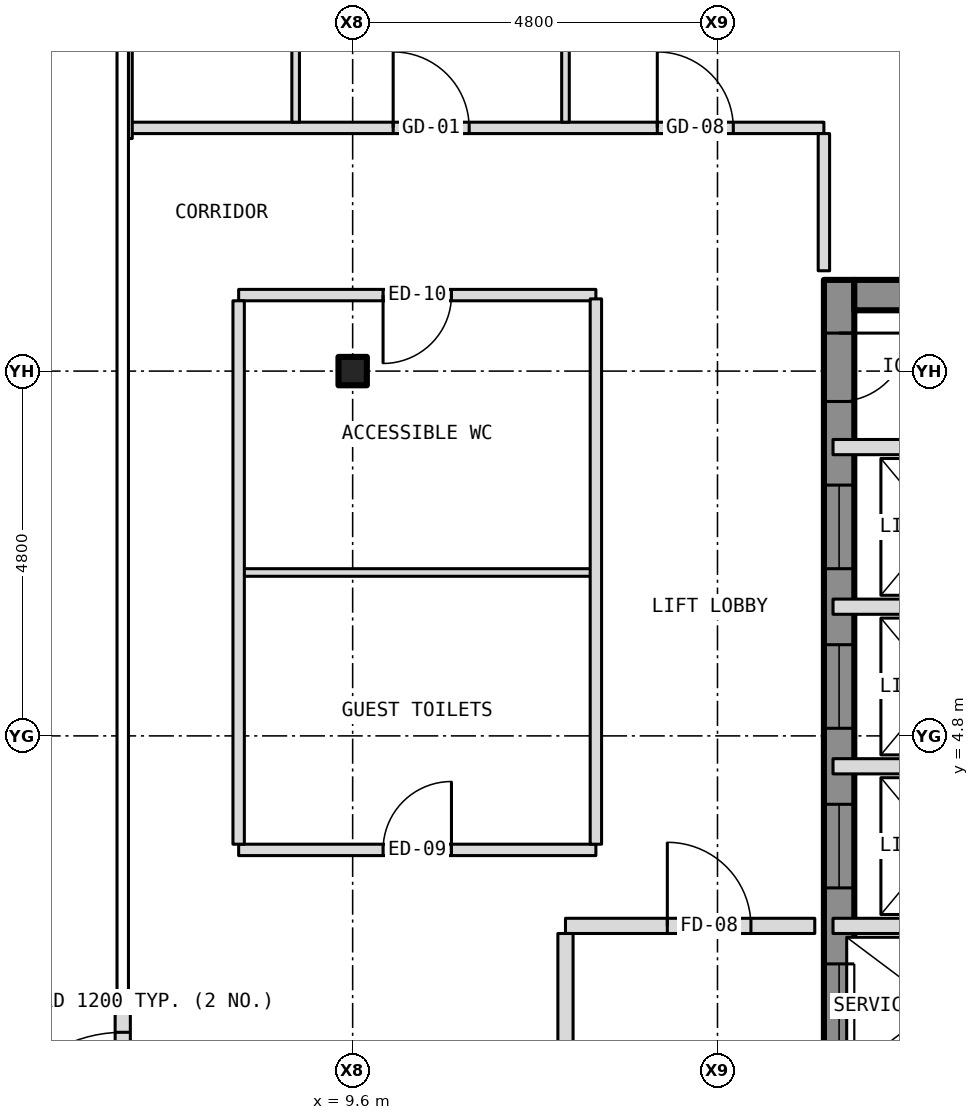
"""IFC4 building model, lengths in metres.
Left out: names, types, materials, properties, quantities, classifications, styles, units other than length and angle.
Written with IfcOpenShell. Run it as: python <this file> out.ifc"""

import sys

from ifc_helpers import new_model, si_unit, direction, frame, frame_2d, origin, origin_2d, place, context, subcontext, project, spatial, rectangle, i_section, extrude, element, fill, save


model = new_model("IFC4")
c1 = context("Model", 3, precision=1e-05, world=origin(), true_north=direction((0.0, 1.0)))
c2 = subcontext(c1, "Body", "Model", "MODEL_VIEW")
j1 = project(units=[si_unit("LENGTHUNIT", "METRE"), si_unit("PLANEANGLEUNIT", "RADIAN")], contexts=[c1])
p1 = place(None, origin())
s1 = spatial("IfcSite", under=j1, at=p1, CompositionType="ELEMENT")
p2 = place(p1, origin())
s2 = spatial("IfcBuilding", under=s1, at=p2, CompositionType="ELEMENT")
p3 = place(p2, frame((0.0, 0.0, 226.0)))
s3 = spatial("IfcBuildingStorey", under=s2, at=p3, CompositionType="ELEMENT", Elevation=226.0)
p4 = place(p3, frame((9.6, 9.6, -0.15), z_axis=(0.0, 0.0, 1.0), x_axis=(1.0, 0.0, 0.0)))
e1 = element("IfcColumn", 1, at=p4, inside=s3, PredefinedType="COLUMN", context=c2, shape_type="SweptSolid", body=[
    extrude(i_section(OverallWidth=0.373, OverallDepth=0.373, WebThickness=0.016, FlangeThickness=0.026, at=origin_2d()), origin(), (0.0, 0.0, 1.0), 3.5),
])
p5 = place(p3, frame((16.0, -10.8, 0.0), z_axis=(0.0, 0.0, 1.0), x_axis=(0.0, 1.0, 0.0)))
e2 = element("IfcWall", 2, at=p5, inside=s3, PredefinedType="SHEAR", context=c2, shape_type="SweptSolid", body=[
    extrude(rectangle(XDim=21.6, YDim=0.4, at=frame_2d((10.8, 0.0))), origin(), (0.0, 0.0, 1.0), 3.25),
])
p6 = place(p5, frame((9.4, 0.0, 0.0)))
e3 = element("IfcOpeningElement", 3, at=p6, cuts=e2, PredefinedType="OPENING", context=c2, shape_type="SweptSolid", body=[
    extrude(rectangle(XDim=1.1, YDim=2.1, at=frame_2d((0.55, 1.05))), frame((0.0, 0.212, 0.0), z_axis=(0.0, -1.0, 0.0), x_axis=(1.0, 0.0, 0.0)), (0.0, 0.0, 1.0), 0.424),
])
p7 = place(p5, frame((11.5, 0.0, 0.0)))
e4 = element("IfcOpeningElement", 4, at=p7, cuts=e2, PredefinedType="OPENING", context=c2, shape_type="SweptSolid", body=[
    extrude(rectangle(XDim=1.1, YDim=2.1, at=frame_2d((0.55, 1.05))), frame((0.0, 0.212, 0.0), z_axis=(0.0, -1.0, 0.0), x_axis=(1.0, 0.0, 0.0)), (0.0, 0.0, 1.0), 0.424),
])
p8 = place(p5, frame((13.6, 0.0, 0.0)))
e5 = element("IfcOpeningElement", 5, at=p8, cuts=e2, PredefinedType="OPENING", context=c2, shape_type="SweptSolid", body=[
    extrude(rectangle(XDim=1.1, YDim=2.1, at=frame_2d((0.55, 1.05))), frame((0.0, 0.212, 0.0), z_axis=(0.0, -1.0, 0.0), x_axis=(1.0, 0.0, 0.0)), (0.0, 0.0, 1.0), 0.424),
])
p9 = place(p5, frame((15.7, 0.0, 0.0)))
e6 = element("IfcOpeningElement", 6, at=p9, cuts=e2, PredefinedType="OPENING", context=c2, shape_type="SweptSolid", body=[
    extrude(rectangle(XDim=1.1, YDim=2.1, at=frame_2d((0.55, 1.05))), frame((0.0, 0.212, 0.0), z_axis=(0.0, -1.0, 0.0), x_axis=(1.0, 0.0, 0.0)), (0.0, 0.0, 1.0), 0.424),
])
p10 = place(p5, frame((17.8, 0.0, 0.0)))
e7 = element("IfcOpeningElement", 7, at=p10, cuts=e2, PredefinedType="OPENING", context=c2, shape_type="SweptSolid", body=[
    extrude(rectangle(XDim=1.1, YDim=2.1, at=frame_2d((0.55, 1.05))), frame((0.0, 0.212, 0.0), z_axis=(0.0, -1.0, 0.0), x_axis=(1.0, 0.0, 0.0)), (0.0, 0.0, 1.0), 0.424),
])
p11 = place(p5, frame((5.642, 0.0, 0.0)))
e8 = element("IfcOpeningElement", 8, at=p11, cuts=e2, PredefinedType="OPENING", context=c2, shape_type="SweptSolid", body=[
    extrude(rectangle(XDim=1.1, YDim=2.1, at=frame_2d((0.55, 1.05))), frame((0.0, 0.212, 0.0), z_axis=(0.0, -1.0, 0.0), x_axis=(1.0, 0.0, 0.0)), (0.0, 0.0, 1.0), 0.424),
])
p12 = place(p5, frame((7.5, 0.0, 0.0)))
e9 = element("IfcOpeningElement", 9, at=p12, cuts=e2, PredefinedType="OPENING", context=c2, shape_type="SweptSolid", body=[
    extrude(rectangle(XDim=1.1, YDim=2.1, at=frame_2d((0.55, 1.05))), frame((0.0, 0.212, 0.0), z_axis=(0.0, -1.0, 0.0), x_axis=(1.0, 0.0, 0.0)), (0.0, 0.0, 1.0), 0.424),
])
p13 = place(p5, frame((20.0, 0.0, 0.0)))
e10 = element("IfcOpeningElement", 10, at=p13, cuts=e2, PredefinedType="OPENING", context=c2, shape_type="SweptSolid", body=[
    extrude(rectangle(XDim=0.9, YDim=2.1, at=frame_2d((0.45, 1.05))), frame((0.0, 0.212, 0.0), z_axis=(0.0, -1.0, 0.0), x_axis=(1.0, 0.0, 0.0)), (0.0, 0.0, 1.0), 0.424),
])
p14 = place(p3, frame((16.2, 10.6, 0.0), z_axis=(0.0, 0.0, 1.0), x_axis=(1.0, 0.0, 0.0)))
e11 = element("IfcWall", 11, at=p14, inside=s3, PredefinedType="SHEAR", context=c2, shape_type="SweptSolid", body=[
    extrude(rectangle(XDim=3.8, YDim=0.4, at=frame_2d((1.9, 0.0))), origin(), (0.0, 0.0, 1.0), 3.25),
])
p15 = place(p3, frame((6.575, -1.4, 0.0), z_axis=(0.0, 0.0, 1.0), x_axis=(0.0, 1.0, 0.0)))
e12 = element("IfcWall", 12, at=p15, inside=s3, PredefinedType="SOLIDWALL", context=c2, shape_type="SweptSolid", body=[
    extrude(rectangle(XDim=2.8, YDim=0.2, at=frame_2d((1.4, 0.0))), origin(), (0.0, 0.0, 1.0), 3.5),
])
p16 = place(p15, frame((0.5, 0.0, 0.0)))
e13 = element("IfcOpeningElement", 13, at=p16, cuts=e12, PredefinedType="OPENING", context=c2, shape_type="SweptSolid", body=[
    extrude(rectangle(XDim=1.8, YDim=2.1, at=frame_2d((0.9, 1.05))), frame((0.0, 0.112, 0.0), z_axis=(0.0, -1.0, 0.0), x_axis=(1.0, 0.0, 0.0)), (0.0, 0.0, 1.0), 0.224),
])
p17 = place(p3, frame((12.4, 2.3, 0.0), z_axis=(0.0, 0.0, 1.0), x_axis=(1.0, 0.0, 0.0)))
e14 = element("IfcWall", 14, at=p17, inside=s3, PredefinedType="PARTITIONING", context=c2, shape_type="SweptSolid", body=[
    extrude(rectangle(XDim=3.28, YDim=0.2, at=frame_2d((1.64, 0.0))), origin(), (0.0, 0.0, 1.0), 3.35),
])
p18 = place(p17, frame((1.34, 0.0, 0.0)))
e15 = element("IfcOpeningElement", 15, at=p18, cuts=e14, PredefinedType="OPENING", context=c2, shape_type="SweptSolid", body=[
    extrude(rectangle(XDim=1.1, YDim=2.1, at=frame_2d((0.55, 1.05))), frame((0.0, 0.112, 0.0), z_axis=(0.0, -1.0, 0.0), x_axis=(1.0, 0.0, 0.0)), (0.0, 0.0, 1.0), 0.224),
])
p19 = place(p3, frame((15.92, 2.3, 0.0), z_axis=(0.0, 0.0, 1.0), x_axis=(1.0, 0.0, 0.0)))
e16 = element("IfcWall", 16, at=p19, inside=s3, PredefinedType="PARTITIONING", context=c2, shape_type="SweptSolid", body=[
    extrude(rectangle(XDim=2.88, YDim=0.2, at=frame_2d((1.44, 0.0))), origin(), (0.0, 0.0, 1.0), 3.25),
])
p20 = place(p3, frame((8.1, 3.3, 0.0), z_axis=(0.0, 0.0, 1.0), x_axis=(1.0, 0.0, 0.0)))
e17 = element("IfcWall", 17, at=p20, inside=s3, PredefinedType="PARTITIONING", context=c2, shape_type="SweptSolid", body=[
    extrude(rectangle(XDim=4.7, YDim=0.15, at=frame_2d((2.35, 0.0))), origin(), (0.0, 0.0, 1.0), 3.35),
])
p21 = place(p20, frame((1.9, 0.0, 0.0)))
e18 = element("IfcOpeningElement", 18, at=p21, cuts=e17, PredefinedType="OPENING", context=c2, shape_type="SweptSolid", body=[
    extrude(rectangle(XDim=0.9, YDim=2.1, at=frame_2d((0.45, 1.05))), frame((0.0, 0.087, 0.0), z_axis=(0.0, -1.0, 0.0), x_axis=(1.0, 0.0, 0.0)), (0.0, 0.0, 1.0), 0.174),
])
for number, where, z_axis, x_axis in (
    (19, (15.92, 4.4, 0.0), (0.0, 0.0, 1.0), (1.0, 0.0, 0.0)),
    (20, (15.92, 6.5, 0.0), (0.0, 0.0, 1.0), (1.0, 0.0, 0.0)),
):
    element("IfcWall", number, at=place(p3, frame(where, z_axis=z_axis, x_axis=x_axis)), inside=s3, PredefinedType="PARTITIONING", context=c2, shape_type="SweptSolid", body=[
        extrude(rectangle(XDim=2.88, YDim=0.2, at=frame_2d((1.44, 0.0))), origin(), (0.0, 0.0, 1.0), 3.25),
    ])
p22 = place(p3, frame((8.1, 6.95, 0.0), z_axis=(0.0, 0.0, 1.0), x_axis=(1.0, 0.0, 0.0)))
e21 = element("IfcWall", 21, at=p22, inside=s3, PredefinedType="PARTITIONING", context=c2, shape_type="SweptSolid", body=[
    extrude(rectangle(XDim=4.7, YDim=0.1, at=frame_2d((2.35, 0.0))), origin(), (0.0, 0.0, 1.0), 3.35),
])
p23 = place(p3, frame((15.92, 8.6, 0.0), z_axis=(0.0, 0.0, 1.0), x_axis=(1.0, 0.0, 0.0)))
e22 = element("IfcWall", 22, at=p23, inside=s3, PredefinedType="PARTITIONING", context=c2, shape_type="SweptSolid", body=[
    extrude(rectangle(XDim=4.36, YDim=0.2, at=frame_2d((2.18, 0.0))), origin(), (0.0, 0.0, 1.0), 3.25),
])
p24 = place(p3, frame((8.1, 10.6, 0.0), z_axis=(0.0, 0.0, 1.0), x_axis=(1.0, 0.0, 0.0)))
e23 = element("IfcWall", 23, at=p24, inside=s3, PredefinedType="PARTITIONING", context=c2, shape_type="SweptSolid", body=[
    extrude(rectangle(XDim=4.7, YDim=0.15, at=frame_2d((2.35, 0.0))), origin(), (0.0, 0.0, 1.0), 3.35),
])
p25 = place(p24, frame((1.9, 0.0, 0.0)))
e24 = element("IfcOpeningElement", 24, at=p25, cuts=e23, PredefinedType="OPENING", context=c2, shape_type="SweptSolid", body=[
    extrude(rectangle(XDim=0.9, YDim=2.1, at=frame_2d((0.45, 1.05))), frame((0.0, 0.087, 0.0), z_axis=(0.0, -1.0, 0.0), x_axis=(1.0, 0.0, 0.0)), (0.0, 0.0, 1.0), 0.174),
])
p26 = place(p3, frame((6.65, 12.8, 0.0), z_axis=(0.0, 0.0, 1.0), x_axis=(1.0, 0.0, 0.0)))
e25 = element("IfcWall", 25, at=p26, inside=s3, PredefinedType="PARTITIONING", context=c2, shape_type="SweptSolid", body=[
    extrude(rectangle(XDim=9.15, YDim=0.15, at=frame_2d((4.575, 0.0))), origin(), (0.0, 0.0, 1.0), 3.35),
])
p27 = place(p26, frame((3.483, 0.0, 0.0)))
e26 = element("IfcOpeningElement", 26, at=p27, cuts=e25, PredefinedType="OPENING", context=c2, shape_type="SweptSolid", body=[
    extrude(rectangle(XDim=1.0, YDim=2.1, at=frame_2d((0.5, 1.05))), frame((0.0, 0.087, 0.0), z_axis=(0.0, -1.0, 0.0), x_axis=(1.0, 0.0, 0.0)), (0.0, 0.0, 1.0), 0.174),
])
p28 = place(p26, frame((6.958, 0.0, 0.0)))
e27 = element("IfcOpeningElement", 27, at=p28, cuts=e25, PredefinedType="OPENING", context=c2, shape_type="SweptSolid", body=[
    extrude(rectangle(XDim=1.0, YDim=2.1, at=frame_2d((0.5, 1.05))), frame((0.0, 0.087, 0.0), z_axis=(0.0, -1.0, 0.0), x_axis=(1.0, 0.0, 0.0)), (0.0, 0.0, 1.0), 0.174),
])
p29 = place(p3, frame((6.65, 12.66, 0.0), z_axis=(0.0, 0.0, 1.0), x_axis=(0.0, 1.0, 0.0)))
e28 = element("IfcWall", 28, at=p29, inside=s3, PredefinedType="PARTITIONING", context=c2, shape_type="SweptSolid", body=[
    extrude(rectangle(XDim=3.48, YDim=0.1, at=frame_2d((1.74, 0.0))), origin(), (0.0, 0.0, 1.0), 3.35),
])
p30 = place(p3, frame((8.1, 3.375, 0.0), z_axis=(0.0, 0.0, 1.0), x_axis=(0.0, 1.0, 0.0)))
e29 = element("IfcWall", 29, at=p30, inside=s3, PredefinedType="PARTITIONING", context=c2, shape_type="SweptSolid", body=[
    extrude(rectangle(XDim=7.15, YDim=0.15, at=frame_2d((3.575, 0.0))), origin(), (0.0, 0.0, 1.0), 3.35),
])
p31 = place(p3, frame((8.85, 12.875, 0.0), z_axis=(0.0, 0.0, 1.0), x_axis=(0.0, 1.0, 0.0)))
e30 = element("IfcWall", 30, at=p31, inside=s3, PredefinedType="PARTITIONING", context=c2, shape_type="SweptSolid", body=[
    extrude(rectangle(XDim=3.075, YDim=0.1, at=frame_2d((1.538, 0.0))), origin(), (0.0, 0.0, 1.0), 3.35),
])
p32 = place(p31, frame((1.971, 0.0, 0.0)))
e31 = element("IfcOpeningElement", 31, at=p32, cuts=e30, PredefinedType="OPENING", context=c2, shape_type="SweptSolid", body=[
    extrude(rectangle(XDim=0.9, YDim=2.1, at=frame_2d((0.45, 1.05))), frame((0.0, 0.062, 0.0), z_axis=(0.0, -1.0, 0.0), x_axis=(1.0, 0.0, 0.0)), (0.0, 0.0, 1.0), 0.124),
])
p33 = place(p3, frame((12.4, -1.8, 0.0), z_axis=(0.0, 0.0, 1.0), x_axis=(0.0, 1.0, 0.0)))
e32 = element("IfcWall", 32, at=p33, inside=s3, PredefinedType="PARTITIONING", context=c2, shape_type="SweptSolid", body=[
    extrude(rectangle(XDim=4.0, YDim=0.2, at=frame_2d((2.0, 0.0))), origin(), (0.0, 0.0, 1.0), 3.35),
])
p34 = place(p33, frame((1.25, 0.0, 0.0)))
e33 = element("IfcOpeningElement", 33, at=p34, cuts=e32, PredefinedType="OPENING", context=c2, shape_type="SweptSolid", body=[
    extrude(rectangle(XDim=1.1, YDim=2.1, at=frame_2d((0.55, 1.05))), frame((0.0, 0.112, 0.0), z_axis=(0.0, -1.0, 0.0), x_axis=(1.0, 0.0, 0.0)), (0.0, 0.0, 1.0), 0.224),
])
p35 = place(p3, frame((12.4, 12.875, 0.0), z_axis=(0.0, 0.0, 1.0), x_axis=(0.0, 1.0, 0.0)))
e34 = element("IfcWall", 34, at=p35, inside=s3, PredefinedType="PARTITIONING", context=c2, shape_type="SweptSolid", body=[
    extrude(rectangle(XDim=7.905, YDim=0.1, at=frame_2d((3.953, 0.0))), origin(), (0.0, 0.0, 1.0), 3.35),
])
p36 = place(p3, frame((12.8, 3.375, 0.0), z_axis=(0.0, 0.0, 1.0), x_axis=(0.0, 1.0, 0.0)))
e35 = element("IfcWall", 35, at=p36, inside=s3, PredefinedType="PARTITIONING", context=c2, shape_type="SweptSolid", body=[
    extrude(rectangle(XDim=7.175, YDim=0.15, at=frame_2d((3.587, 0.0))), origin(), (0.0, 0.0, 1.0), 3.35),
])
p37 = place(p3, frame((15.8, 10.92, 0.0), z_axis=(0.0, 0.0, 1.0), x_axis=(0.0, 1.0, 0.0)))
e36 = element("IfcWall", 36, at=p37, inside=s3, PredefinedType="PARTITIONING", context=c2, shape_type="SweptSolid", body=[
    extrude(rectangle(XDim=1.805, YDim=0.15, at=frame_2d((0.903, 0.0))), origin(), (0.0, 0.0, 1.0), 3.35),
])
p38 = place(p16, origin())
e37 = element("IfcDoor", 37, at=p38, inside=s3, OperationType="DOUBLE_DOOR_DOUBLE_SWING", PredefinedType="DOOR", context=c2, shape_type="SweptSolid", body=[
    extrude(rectangle(XDim=1.8, YDim=2.1, at=frame_2d((0.9, 1.05))), frame((0.0, 0.025, 0.0), z_axis=(0.0, -1.0, 0.0), x_axis=(1.0, 0.0, 0.0)), (0.0, 0.0, 1.0), 0.05),
])
fill(e13, e37)
p39 = place(p7, origin())
e38 = element("IfcDoor", 38, at=p39, inside=s3, OperationType="SLIDING_TO_LEFT", PredefinedType="DOOR", context=c2, shape_type="SweptSolid", body=[
    extrude(rectangle(XDim=1.1, YDim=2.1, at=frame_2d((0.55, 1.05))), frame((0.0, 0.025, 0.0), z_axis=(0.0, -1.0, 0.0), x_axis=(1.0, 0.0, 0.0)), (0.0, 0.0, 1.0), 0.05),
])
fill(e4, e38)
p40 = place(p8, origin())
e39 = element("IfcDoor", 39, at=p40, inside=s3, OperationType="SLIDING_TO_LEFT", PredefinedType="DOOR", context=c2, shape_type="SweptSolid", body=[
    extrude(rectangle(XDim=1.1, YDim=2.1, at=frame_2d((0.55, 1.05))), frame((0.0, 0.025, 0.0), z_axis=(0.0, -1.0, 0.0), x_axis=(1.0, 0.0, 0.0)), (0.0, 0.0, 1.0), 0.05),
])
fill(e5, e39)
p41 = place(p9, origin())
e40 = element("IfcDoor", 40, at=p41, inside=s3, OperationType="SLIDING_TO_LEFT", PredefinedType="DOOR", context=c2, shape_type="SweptSolid", body=[
    extrude(rectangle(XDim=1.1, YDim=2.1, at=frame_2d((0.55, 1.05))), frame((0.0, 0.025, 0.0), z_axis=(0.0, -1.0, 0.0), x_axis=(1.0, 0.0, 0.0)), (0.0, 0.0, 1.0), 0.05),
])
fill(e6, e40)
p42 = place(p10, origin())
e41 = element("IfcDoor", 41, at=p42, inside=s3, OperationType="SLIDING_TO_LEFT", PredefinedType="DOOR", context=c2, shape_type="SweptSolid", body=[
    extrude(rectangle(XDim=1.1, YDim=2.1, at=frame_2d((0.55, 1.05))), frame((0.0, 0.025, 0.0), z_axis=(0.0, -1.0, 0.0), x_axis=(1.0, 0.0, 0.0)), (0.0, 0.0, 1.0), 0.05),
])
fill(e7, e41)
p43 = place(p13, origin())
e42 = element("IfcDoor", 42, at=p43, inside=s3, OperationType="SINGLE_SWING_RIGHT", PredefinedType="DOOR", context=c2, shape_type="SweptSolid", body=[
    extrude(rectangle(XDim=0.9, YDim=2.1, at=frame_2d((0.45, 1.05))), frame((0.0, 0.025, 0.0), z_axis=(0.0, -1.0, 0.0), x_axis=(1.0, 0.0, 0.0)), (0.0, 0.0, 1.0), 0.05),
])
fill(e10, e42)
p44 = place(p18, origin())
e43 = element("IfcDoor", 43, at=p44, inside=s3, OperationType="SINGLE_SWING_LEFT", PredefinedType="DOOR", context=c2, shape_type="SweptSolid", body=[
    extrude(rectangle(XDim=1.1, YDim=2.1, at=frame_2d((0.55, 1.05))), frame((0.0, 0.025, 0.0), z_axis=(0.0, -1.0, 0.0), x_axis=(1.0, 0.0, 0.0)), (0.0, 0.0, 1.0), 0.05),
])
fill(e15, e43)
p45 = place(p27, origin())
e44 = element("IfcDoor", 44, at=p45, inside=s3, OperationType="SINGLE_SWING_LEFT", PredefinedType="DOOR", context=c2, shape_type="SweptSolid", body=[
    extrude(rectangle(XDim=1.0, YDim=2.1, at=frame_2d((0.5, 1.05))), frame((0.0, 0.025, 0.0), z_axis=(0.0, -1.0, 0.0), x_axis=(1.0, 0.0, 0.0)), (0.0, 0.0, 1.0), 0.05),
])
fill(e26, e44)
p46 = place(p28, origin())
e45 = element("IfcDoor", 45, at=p46, inside=s3, OperationType="SINGLE_SWING_LEFT", PredefinedType="DOOR", context=c2, shape_type="SweptSolid", body=[
    extrude(rectangle(XDim=1.0, YDim=2.1, at=frame_2d((0.5, 1.05))), frame((0.0, 0.025, 0.0), z_axis=(0.0, -1.0, 0.0), x_axis=(1.0, 0.0, 0.0)), (0.0, 0.0, 1.0), 0.05),
])
fill(e27, e45)
p47 = place(p21, origin())
e46 = element("IfcDoor", 46, at=p47, inside=s3, OperationType="SINGLE_SWING_RIGHT", PredefinedType="DOOR", context=c2, shape_type="SweptSolid", body=[
    extrude(rectangle(XDim=0.9, YDim=2.1, at=frame_2d((0.45, 1.05))), frame((0.0, 0.025, 0.0), z_axis=(0.0, -1.0, 0.0), x_axis=(1.0, 0.0, 0.0)), (0.0, 0.0, 1.0), 0.05),
])
fill(e18, e46)
p48 = place(p25, origin())
e47 = element("IfcDoor", 47, at=p48, inside=s3, OperationType="SINGLE_SWING_LEFT", PredefinedType="DOOR", context=c2, shape_type="SweptSolid", body=[
    extrude(rectangle(XDim=0.9, YDim=2.1, at=frame_2d((0.45, 1.05))), frame((0.0, 0.025, 0.0), z_axis=(0.0, -1.0, 0.0), x_axis=(1.0, 0.0, 0.0)), (0.0, 0.0, 1.0), 0.05),
])
fill(e24, e47)
save(model, sys.argv[1])
